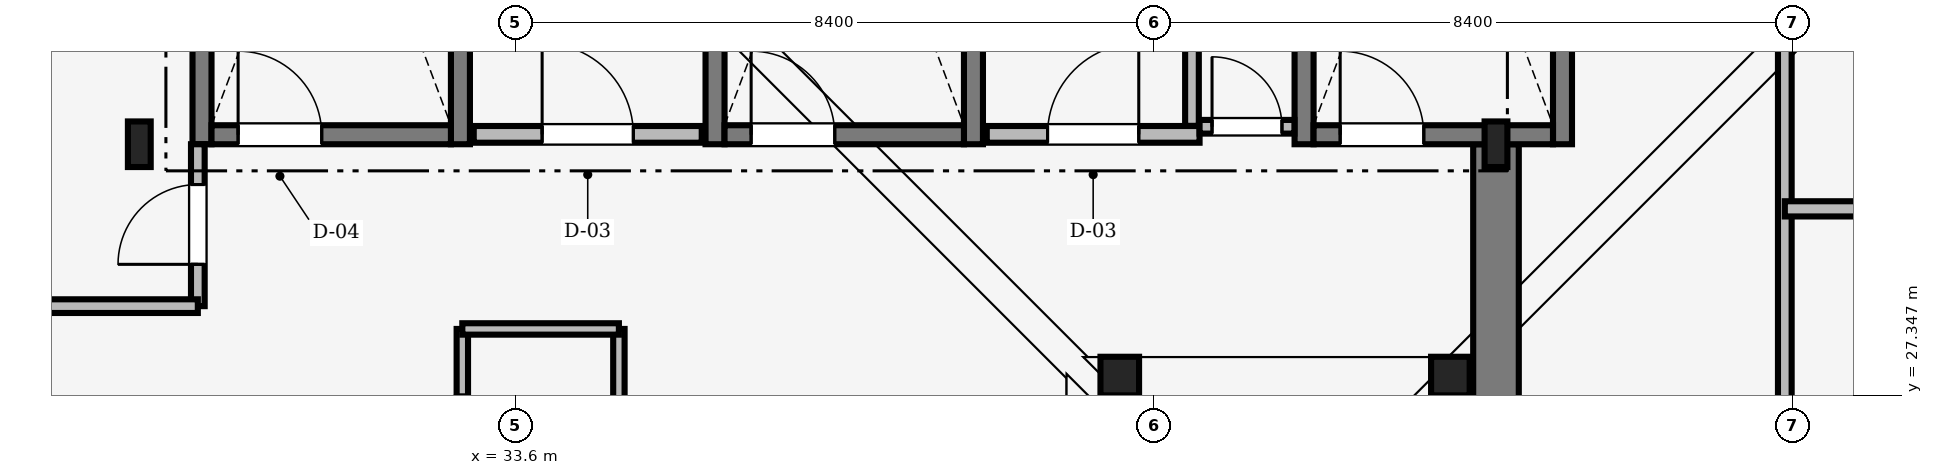
"""IFC4 building model, lengths in metres.
Left out: names, types, materials, properties, quantities, classifications, styles, units other than length and angle.
Written with IfcOpenShell. Run it as: python <this file> out.ifc"""

import sys

from ifc_helpers import new_model, si_unit, direction, frame, frame_2d, origin, origin_2d, place, context, subcontext, project, spatial, rectangle, hollow_circle, i_section, extrude, source, transform, mapped, element, fill, save


model = new_model("IFC4")
c1 = context("Model", 3, precision=1e-05, world=origin(), true_north=direction((0.0, 1.0)))
c2 = subcontext(c1, "Body", "Model", "MODEL_VIEW")
j1 = project(units=[si_unit("LENGTHUNIT", "METRE"), si_unit("PLANEANGLEUNIT", "RADIAN")], contexts=[c1])
p1 = place(None, origin())
s1 = spatial("IfcSite", under=j1, at=p1, CompositionType="ELEMENT")
p2 = place(p1, origin())
s2 = spatial("IfcBuilding", under=s1, at=p2, CompositionType="ELEMENT")
p3 = place(p2, frame((0.0, 0.0, 301.15)))
s3 = spatial("IfcBuildingStorey", under=s2, at=p3, CompositionType="ELEMENT", Elevation=301.15)
m1 = source(origin(), c2, "Body", "SweptSolid", [
    extrude(rectangle(XDim=13.15, YDim=0.6, at=frame_2d((6.575, 0.0))), origin(), (0.0, 0.0, 1.0), 4.7),
])
p4 = place(p3, frame((46.5, 17.5, 0.0), z_axis=(0.0, 0.0, 1.0), x_axis=(0.0, 1.0, 0.0)))
e1 = element("IfcWall", 1, at=p4, inside=s3, PredefinedType="SHEAR", context=c2, shape_type="MappedRepresentation", body=[
    mapped(m1, transform((0.0, 0.0, 0.0), scale=1.0)),
])
m2 = source(origin(), c2, "Body", "SweptSolid", [
    extrude(i_section(OverallWidth=0.3, OverallDepth=0.6, WebThickness=0.015, FlangeThickness=0.03, FilletRadius=0.027, at=origin_2d()), origin(), (0.0, 0.0, 1.0), 4.6),
])
for number, where, z_axis, x_axis in (
    (2, (28.65, 30.65, 0.0), (0.0, 0.0, 1.0), (1.0, 0.0, 0.0)),
    (3, (46.5, 30.65, 0.0), (0.0, 0.0, 1.0), (1.0, 0.0, 0.0)),
):
    element("IfcColumn", number, at=place(p3, frame(where, z_axis=z_axis, x_axis=x_axis)), inside=s3, PredefinedType="COLUMN", context=c2, shape_type="MappedRepresentation", body=[
        mapped(m2, transform((0.0, 0.0, 0.0), scale=1.0)),
    ])
m3 = source(origin(), c2, "Body", "SweptSolid", [
    extrude(hollow_circle(Radius=0.254, WallThickness=0.025, at=origin_2d()), origin(), (0.0, 0.0, 1.0), 17.12),
])
for number, where, z_axis, x_axis in (
    (4, (45.9, 27.6, 4.6), (0.0, 0.0, 1.0), (1.0, 0.0, 0.0)),
    (5, (41.55, 27.6, 4.6), (0.0, 0.0, 1.0), (1.0, 0.0, 0.0)),
):
    element("IfcColumn", number, at=place(p3, frame(where, z_axis=z_axis, x_axis=x_axis)), inside=s3, PredefinedType="COLUMN", context=c2, shape_type="MappedRepresentation", body=[
        mapped(m3, transform((0.0, 0.0, 0.0), scale=1.0)),
    ])
m4 = source(origin(), c2, "Body", "SweptSolid", [
    extrude(rectangle(XDim=9.35, YDim=0.25, at=frame_2d((4.675, 0.0))), origin(), (0.0, 0.0, 1.0), 4.6),
])
for number, where, z_axis, x_axis in (
    (6, (29.475, 30.65, 0.0), (0.0, 0.0, 1.0), (0.0, 1.0, 0.0)),
    (7, (32.875, 30.65, 0.0), (0.0, 0.0, 1.0), (0.0, 1.0, 0.0)),
):
    element("IfcWall", number, at=place(p3, frame(where, z_axis=z_axis, x_axis=x_axis)), inside=s3, PredefinedType="SOLIDWALL", context=c2, shape_type="MappedRepresentation", body=[
        mapped(m4, transform((0.0, 0.0, 0.0), scale=1.0)),
    ])
m5 = source(origin(), c2, "Body", "SweptSolid", [
    extrude(rectangle(XDim=3.15, YDim=0.25, at=frame_2d((1.575, 0.0))), origin(), (0.0, 0.0, 1.0), 4.6),
])
p5 = place(p3, frame((29.6, 30.775, 0.0), z_axis=(0.0, 0.0, 1.0), x_axis=(1.0, 0.0, 0.0)))
e8 = element("IfcWall", 8, at=p5, inside=s3, PredefinedType="SOLIDWALL", context=c2, shape_type="MappedRepresentation", body=[
    mapped(m5, transform((0.0, 0.0, 0.0), scale=1.0)),
])
m6 = source(origin(), c2, "Body", "SweptSolid", [
    extrude(rectangle(XDim=1.1, YDim=2.2, at=frame_2d((0.55, 1.1))), frame((0.0, 0.135, 0.0), z_axis=(0.0, -1.0, 0.0), x_axis=(1.0, 0.0, 0.0)), (0.0, 0.0, 1.0), 0.27),
])
p6 = place(p5, frame((0.35, 0.0, 0.0)))
e9 = element("IfcOpeningElement", 9, at=p6, cuts=e8, PredefinedType="OPENING", context=c2, shape_type="MappedRepresentation", body=[
    mapped(m6, transform((0.0, 0.0, 0.0), scale=1.0)),
])
for number, where, z_axis, x_axis in (
    (10, (36.225, 30.65, 0.0), (0.0, 0.0, 1.0), (0.0, 1.0, 0.0)),
    (11, (39.625, 30.65, 0.0), (0.0, 0.0, 1.0), (0.0, 1.0, 0.0)),
):
    element("IfcWall", number, at=place(p3, frame(where, z_axis=z_axis, x_axis=x_axis)), inside=s3, PredefinedType="SOLIDWALL", context=c2, shape_type="MappedRepresentation", body=[
        mapped(m4, transform((0.0, 0.0, 0.0), scale=1.0)),
    ])
p7 = place(p3, frame((36.35, 30.775, 0.0), z_axis=(0.0, 0.0, 1.0), x_axis=(1.0, 0.0, 0.0)))
e12 = element("IfcWall", 12, at=p7, inside=s3, PredefinedType="SOLIDWALL", context=c2, shape_type="MappedRepresentation", body=[
    mapped(m5, transform((0.0, 0.0, 0.0), scale=1.0)),
])
p8 = place(p7, frame((0.35, 0.0, 0.0)))
e13 = element("IfcOpeningElement", 13, at=p8, cuts=e12, PredefinedType="OPENING", context=c2, shape_type="MappedRepresentation", body=[
    mapped(m6, transform((0.0, 0.0, 0.0), scale=1.0)),
])
for number, where, z_axis, x_axis in (
    (14, (43.975, 30.65, 0.0), (0.0, 0.0, 1.0), (0.0, 1.0, 0.0)),
    (15, (47.375, 30.65, 0.0), (0.0, 0.0, 1.0), (0.0, 1.0, 0.0)),
):
    element("IfcWall", number, at=place(p3, frame(where, z_axis=z_axis, x_axis=x_axis)), inside=s3, PredefinedType="SOLIDWALL", context=c2, shape_type="MappedRepresentation", body=[
        mapped(m4, transform((0.0, 0.0, 0.0), scale=1.0)),
    ])
p9 = place(p3, frame((44.1, 30.775, 0.0), z_axis=(0.0, 0.0, 1.0), x_axis=(1.0, 0.0, 0.0)))
e16 = element("IfcWall", 16, at=p9, inside=s3, PredefinedType="SOLIDWALL", context=c2, shape_type="MappedRepresentation", body=[
    mapped(m5, transform((0.0, 0.0, 0.0), scale=1.0)),
])
p10 = place(p9, frame((0.35, 0.0, 0.0)))
e17 = element("IfcOpeningElement", 17, at=p10, cuts=e16, PredefinedType="OPENING", context=c2, shape_type="MappedRepresentation", body=[
    mapped(m6, transform((0.0, 0.0, 0.0), scale=1.0)),
])
m7 = source(origin(), c2, "Body", "SweptSolid", [
    extrude(rectangle(XDim=3.0, YDim=0.22, at=frame_2d((1.5, 0.0))), origin(), (0.0, 0.0, 1.0), 4.6),
])
p11 = place(p3, frame((33.05, 30.78, 0.0), z_axis=(0.0, 0.0, 1.0), x_axis=(1.0, 0.0, 0.0)))
e18 = element("IfcWall", 18, at=p11, inside=s3, PredefinedType="SOLIDWALL", context=c2, shape_type="MappedRepresentation", body=[
    mapped(m7, transform((0.0, 0.0, 0.0), scale=1.0)),
])
m8 = source(origin(), c2, "Body", "SweptSolid", [
    extrude(rectangle(XDim=1.2, YDim=2.2, at=frame_2d((0.6, 1.1))), frame((0.0, 0.12, 0.0), z_axis=(0.0, -1.0, 0.0), x_axis=(1.0, 0.0, 0.0)), (0.0, 0.0, 1.0), 0.24),
])
p12 = place(p11, frame((0.9, 0.0, 0.0)))
e19 = element("IfcOpeningElement", 19, at=p12, cuts=e18, PredefinedType="OPENING", context=c2, shape_type="MappedRepresentation", body=[
    mapped(m8, transform((0.0, 0.0, 0.0), scale=1.0)),
])
m9 = source(origin(), c2, "Body", "SweptSolid", [
    extrude(rectangle(XDim=2.8, YDim=0.22, at=frame_2d((1.4, 0.0))), origin(), (0.0, 0.0, 1.0), 4.6),
])
p13 = place(p3, frame((39.8, 30.78, 0.0), z_axis=(0.0, 0.0, 1.0), x_axis=(1.0, 0.0, 0.0)))
e20 = element("IfcWall", 20, at=p13, inside=s3, PredefinedType="SOLIDWALL", context=c2, shape_type="MappedRepresentation", body=[
    mapped(m9, transform((0.0, 0.0, 0.0), scale=1.0)),
])
p14 = place(p13, frame((0.8, 0.0, 0.0)))
e21 = element("IfcOpeningElement", 21, at=p14, cuts=e20, PredefinedType="OPENING", context=c2, shape_type="MappedRepresentation", body=[
    mapped(m8, transform((0.0, 0.0, 0.0), scale=1.0)),
])
m10 = source(origin(), c2, "Body", "SweptSolid", [
    extrude(rectangle(XDim=25.888, YDim=0.18, at=frame_2d((12.944, 0.0))), origin(), (0.0, 0.0, 1.0), 4.142),
])
p15 = place(p3, frame((50.3, 16.45, 0.0), z_axis=(0.0, 0.0, 1.0), x_axis=(0.0, 1.0, 0.0)))
e22 = element("IfcWall", 22, at=p15, inside=s3, PredefinedType="PARTITIONING", context=c2, shape_type="MappedRepresentation", body=[
    mapped(m10, transform((0.0, 0.0, 0.0), scale=1.0)),
])
m11 = source(origin(), c2, "Body", "SweptSolid", [
    extrude(rectangle(XDim=1.05, YDim=2.2, at=frame_2d((0.525, 1.1))), frame((0.0, 0.1, 0.0), z_axis=(0.0, -1.0, 0.0), x_axis=(1.0, 0.0, 0.0)), (0.0, 0.0, 1.0), 0.2),
])
p16 = place(p15, frame((2.88, 0.0, 0.0)))
e23 = element("IfcOpeningElement", 23, at=p16, cuts=e22, PredefinedType="OPENING", context=c2, shape_type="MappedRepresentation", body=[
    mapped(m11, transform((0.0, 0.0, 0.0), scale=1.0)),
])
p17 = place(p15, frame((9.53, 0.0, 0.0)))
e24 = element("IfcOpeningElement", 24, at=p17, cuts=e22, PredefinedType="OPENING", context=c2, shape_type="MappedRepresentation", body=[
    mapped(m11, transform((0.0, 0.0, 0.0), scale=1.0)),
])
p18 = place(p15, frame((15.83, 0.0, 0.0)))
e25 = element("IfcOpeningElement", 25, at=p18, cuts=e22, PredefinedType="OPENING", context=c2, shape_type="MappedRepresentation", body=[
    mapped(m11, transform((0.0, 0.0, 0.0), scale=1.0)),
])
p19 = place(p15, frame((22.085, 0.0, 0.0)))
e26 = element("IfcOpeningElement", 26, at=p19, cuts=e22, PredefinedType="OPENING", context=c2, shape_type="MappedRepresentation", body=[
    mapped(m11, transform((0.0, 0.0, 0.0), scale=1.0)),
])
m12 = source(origin(), c2, "Body", "SweptSolid", [
    extrude(rectangle(XDim=2.13, YDim=0.18, at=frame_2d((1.065, 0.0))), origin(), (0.0, 0.0, 1.0), 4.6),
])
p20 = place(p3, frame((29.42, 28.52, 0.0), z_axis=(0.0, 0.0, 1.0), x_axis=(0.0, 1.0, 0.0)))
e27 = element("IfcWall", 27, at=p20, inside=s3, PredefinedType="PARTITIONING", context=c2, shape_type="MappedRepresentation", body=[
    mapped(m12, transform((0.0, 0.0, 0.0), scale=1.0)),
])
p21 = place(p20, frame((0.55, 0.0, 0.0)))
e28 = element("IfcOpeningElement", 28, at=p21, cuts=e27, PredefinedType="OPENING", context=c2, shape_type="MappedRepresentation", body=[
    mapped(m11, transform((0.0, 0.0, 0.0), scale=1.0)),
])
m13 = source(origin(), c2, "Body", "SweptSolid", [
    extrude(rectangle(XDim=2.44, YDim=0.15, at=frame_2d((1.22, 0.0))), origin(), (0.0, 0.0, 1.0), 4.6),
])
p22 = place(p3, frame((32.9, 25.78, 0.0), z_axis=(0.0, 0.0, 1.0), x_axis=(0.0, 1.0, 0.0)))
e29 = element("IfcWall", 29, at=p22, inside=s3, PredefinedType="PARTITIONING", context=c2, shape_type="MappedRepresentation", body=[
    mapped(m13, transform((0.0, 0.0, 0.0), scale=1.0)),
])
m14 = source(origin(), c2, "Body", "SweptSolid", [
    extrude(rectangle(XDim=0.92, YDim=2.1, at=frame_2d((0.46, 1.05))), frame((0.0, 0.085, 0.0), z_axis=(0.0, -1.0, 0.0), x_axis=(1.0, 0.0, 0.0)), (0.0, 0.0, 1.0), 0.17),
])
p23 = place(p22, frame((0.65, 0.0, 0.0)))
e30 = element("IfcOpeningElement", 30, at=p23, cuts=e29, PredefinedType="OPENING", context=c2, shape_type="MappedRepresentation", body=[
    mapped(m14, transform((0.0, 0.0, 0.0), scale=1.0)),
])
m15 = source(origin(), c2, "Body", "SweptSolid", [
    extrude(rectangle(XDim=1.248, YDim=0.18, at=frame_2d((0.624, 0.0))), origin(), (0.0, 0.0, 1.0), 4.6),
])
p24 = place(p3, frame((42.6, 30.88, 0.0), z_axis=(0.0, 0.0, 1.0), x_axis=(1.0, 0.0, 0.0)))
e31 = element("IfcWall", 31, at=p24, inside=s3, PredefinedType="PARTITIONING", context=c2, shape_type="MappedRepresentation", body=[
    mapped(m15, transform((0.0, 0.0, 0.0), scale=1.0)),
])
m16 = source(origin(), c2, "Body", "SweptSolid", [
    extrude(rectangle(XDim=0.92, YDim=2.1, at=frame_2d((0.46, 1.05))), frame((0.0, 0.1, 0.0), z_axis=(0.0, -1.0, 0.0), x_axis=(1.0, 0.0, 0.0)), (0.0, 0.0, 1.0), 0.2),
])
p25 = place(p24, frame((0.164, 0.0, 0.0)))
e32 = element("IfcOpeningElement", 32, at=p25, cuts=e31, PredefinedType="OPENING", context=c2, shape_type="MappedRepresentation", body=[
    mapped(m16, transform((0.0, 0.0, 0.0), scale=1.0)),
])
m17 = source(origin(), c2, "Body", "SweptSolid", [
    extrude(rectangle(XDim=10.338, YDim=0.2, at=frame_2d((5.169, 0.0))), origin(), (0.0, 0.0, 1.0), 4.142),
])
p26 = place(p3, frame((50.3, 29.8, 0.0), z_axis=(0.0, 0.0, 1.0), x_axis=(1.0, 0.0, 0.0)))
e33 = element("IfcWall", 33, at=p26, inside=s3, PredefinedType="PARTITIONING", context=c2, shape_type="MappedRepresentation", body=[
    mapped(m17, transform((0.0, 0.0, 0.0), scale=1.0)),
])
m18 = source(origin(), c2, "Body", "SweptSolid", [
    extrude(rectangle(XDim=3.758, YDim=0.18, at=frame_2d((1.879, 0.0))), origin(), (0.0, 0.0, 1.0), 4.6),
])
p27 = place(p3, frame((42.5, 30.892, 0.0), z_axis=(0.0, 0.0, 1.0), x_axis=(0.0, 1.0, 0.0)))
e34 = element("IfcWall", 34, at=p27, inside=s3, PredefinedType="PARTITIONING", context=c2, shape_type="MappedRepresentation", body=[
    mapped(m18, transform((0.0, 0.0, 0.0), scale=1.0)),
])
m19 = source(origin(), c2, "Body", "SweptSolid", [
    extrude(rectangle(XDim=3.058, YDim=0.18, at=frame_2d((1.529, 0.0))), origin(), (0.0, 0.0, 1.0), 4.142),
])
p28 = place(p3, frame((26.362, 28.52, 0.0), z_axis=(0.0, 0.0, 1.0), x_axis=(1.0, 0.0, 0.0)))
e35 = element("IfcWall", 35, at=p28, inside=s3, PredefinedType="PARTITIONING", context=c2, shape_type="MappedRepresentation", body=[
    mapped(m19, transform((0.0, 0.0, 0.0), scale=1.0)),
])
p29 = place(p3, frame((34.96, 25.78, 0.0), z_axis=(0.0, 0.0, 1.0), x_axis=(0.0, 1.0, 0.0)))
e36 = element("IfcWall", 36, at=p29, inside=s3, PredefinedType="PARTITIONING", context=c2, shape_type="MappedRepresentation", body=[
    mapped(m13, transform((0.0, 0.0, 0.0), scale=1.0)),
])
m20 = source(origin(), c2, "Body", "SweptSolid", [
    extrude(rectangle(XDim=2.06, YDim=0.15, at=frame_2d((1.03, 0.0))), origin(), (0.0, 0.0, 1.0), 4.6),
])
p30 = place(p3, frame((32.9, 28.22, 0.0), z_axis=(0.0, 0.0, 1.0), x_axis=(1.0, 0.0, 0.0)))
e37 = element("IfcWall", 37, at=p30, inside=s3, PredefinedType="PARTITIONING", context=c2, shape_type="MappedRepresentation", body=[
    mapped(m20, transform((0.0, 0.0, 0.0), scale=1.0)),
])
m21 = source(origin(), c2, "Body", "SweptSolid", [
    extrude(rectangle(XDim=1.1, YDim=2.2, at=frame_2d((0.55, 1.1))), frame((0.0, 0.025, 0.0), z_axis=(0.0, -1.0, 0.0), x_axis=(1.0, 0.0, 0.0)), (0.0, 0.0, 1.0), 0.05),
])
p31 = place(p6, origin())
e38 = element("IfcDoor", 38, at=p31, inside=s3, OperationType="SINGLE_SWING_LEFT", PredefinedType="DOOR", context=c2, shape_type="MappedRepresentation", body=[
    mapped(m21, transform((0.0, 0.0, 0.0), scale=1.0)),
])
fill(e9, e38)
p32 = place(p8, origin())
e39 = element("IfcDoor", 39, at=p32, inside=s3, OperationType="SINGLE_SWING_LEFT", PredefinedType="DOOR", context=c2, shape_type="MappedRepresentation", body=[
    mapped(m21, transform((0.0, 0.0, 0.0), scale=1.0)),
])
fill(e13, e39)
p33 = place(p10, origin())
e40 = element("IfcDoor", 40, at=p33, inside=s3, OperationType="SINGLE_SWING_LEFT", PredefinedType="DOOR", context=c2, shape_type="MappedRepresentation", body=[
    mapped(m21, transform((0.0, 0.0, 0.0), scale=1.0)),
])
fill(e17, e40)
m22 = source(origin(), c2, "Body", "SweptSolid", [
    extrude(rectangle(XDim=1.2, YDim=2.2, at=frame_2d((0.6, 1.1))), frame((0.0, 0.025, 0.0), z_axis=(0.0, -1.0, 0.0), x_axis=(1.0, 0.0, 0.0)), (0.0, 0.0, 1.0), 0.05),
])
p34 = place(p12, origin())
e41 = element("IfcDoor", 41, at=p34, inside=s3, OperationType="SINGLE_SWING_LEFT", PredefinedType="DOOR", context=c2, shape_type="MappedRepresentation", body=[
    mapped(m22, transform((0.0, 0.0, 0.0), scale=1.0)),
])
fill(e19, e41)
p35 = place(p14, origin())
e42 = element("IfcDoor", 42, at=p35, inside=s3, OperationType="SINGLE_SWING_RIGHT", PredefinedType="DOOR", context=c2, shape_type="MappedRepresentation", body=[
    mapped(m22, transform((0.0, 0.0, 0.0), scale=1.0)),
])
fill(e21, e42)
m23 = source(origin(), c2, "Body", "SweptSolid", [
    extrude(rectangle(XDim=1.05, YDim=2.2, at=frame_2d((0.525, 1.1))), frame((0.0, 0.025, 0.0), z_axis=(0.0, -1.0, 0.0), x_axis=(1.0, 0.0, 0.0)), (0.0, 0.0, 1.0), 0.05),
])
p36 = place(p21, origin())
e43 = element("IfcDoor", 43, at=p36, inside=s3, OperationType="SINGLE_SWING_LEFT", PredefinedType="DOOR", context=c2, shape_type="MappedRepresentation", body=[
    mapped(m23, transform((0.0, 0.0, 0.0), scale=1.0)),
])
fill(e28, e43)
m24 = source(origin(), c2, "Body", "SweptSolid", [
    extrude(rectangle(XDim=0.92, YDim=2.1, at=frame_2d((0.46, 1.05))), frame((0.0, 0.025, 0.0), z_axis=(0.0, -1.0, 0.0), x_axis=(1.0, 0.0, 0.0)), (0.0, 0.0, 1.0), 0.05),
])
p37 = place(p25, origin())
e44 = element("IfcDoor", 44, at=p37, inside=s3, OperationType="SINGLE_SWING_LEFT", PredefinedType="DOOR", context=c2, shape_type="MappedRepresentation", body=[
    mapped(m24, transform((0.0, 0.0, 0.0), scale=1.0)),
])
fill(e32, e44)
save(model, sys.argv[1])
